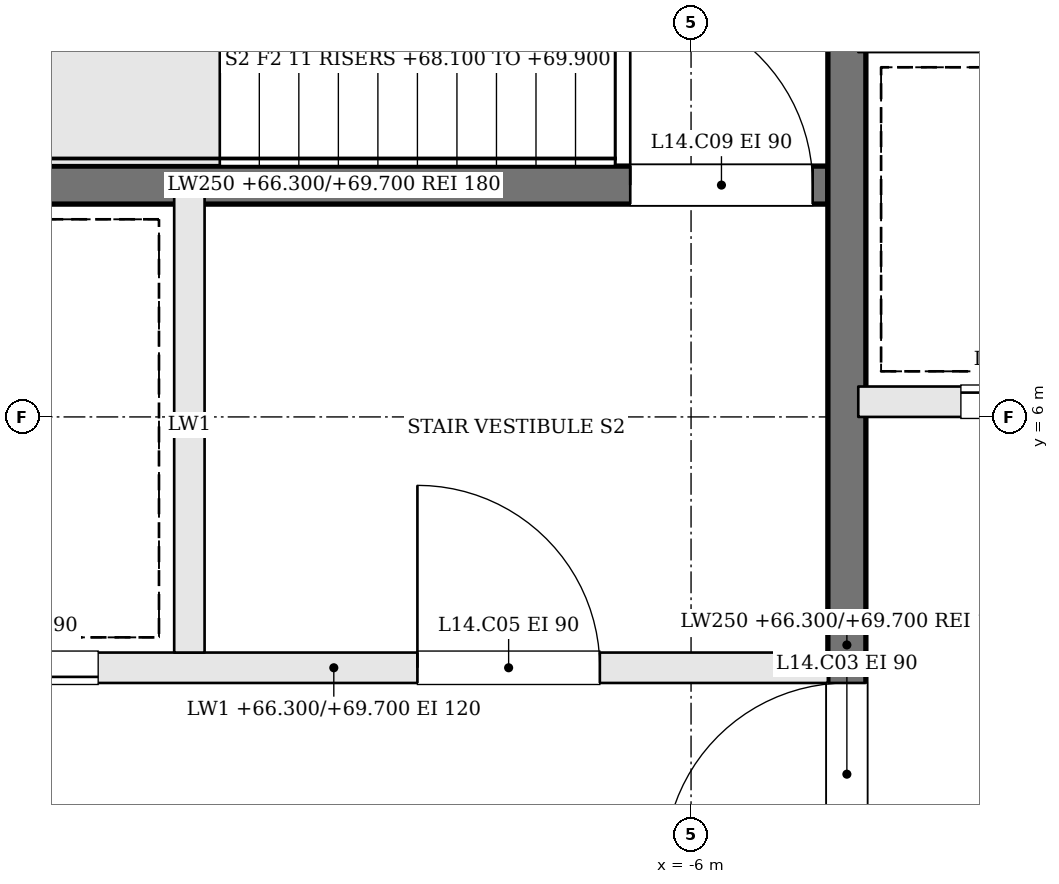
"""IFC4 building model, lengths in metres.
Left out: names, types, materials, properties, quantities, classifications, styles, units other than length and angle.
Written with IfcOpenShell. Run it as: python <this file> out.ifc"""

import sys

from ifc_helpers import new_model, si_unit, direction, frame, frame_2d, origin, place, context, subcontext, project, spatial, rectangle, extrude, element, fill, save


model = new_model("IFC4")
c1 = context("Model", 3, precision=1e-05, world=origin(), true_north=direction((0.0, 1.0)))
c2 = subcontext(c1, "Body", "Model", "MODEL_VIEW")
j1 = project(units=[si_unit("LENGTHUNIT", "METRE"), si_unit("PLANEANGLEUNIT", "RADIAN")], contexts=[c1])
p1 = place(None, origin())
s1 = spatial("IfcSite", under=j1, at=p1, CompositionType="ELEMENT")
p2 = place(p1, origin())
s2 = spatial("IfcBuilding", under=s1, at=p2, CompositionType="ELEMENT")
p3 = place(p2, frame((0.0, 0.0, 66.3)))
s3 = spatial("IfcBuildingStorey", under=s2, at=p3, CompositionType="ELEMENT", Elevation=66.3)
p4 = place(p3, frame((-11.6, 4.35, 0.0), z_axis=(0.0, 0.0, 1.0), x_axis=(1.0, 0.0, 0.0)))
e1 = element("IfcWall", 1, at=p4, inside=s3, PredefinedType="SOLIDWALL", context=c2, shape_type="SweptSolid", body=[
    extrude(rectangle(XDim=6.5, YDim=0.2, at=frame_2d((3.25, 0.0))), origin(), (0.0, 0.0, 1.0), 3.4),
])
p5 = place(p4, frame((3.8, 0.0, 0.0)))
e2 = element("IfcOpeningElement", 2, at=p5, cuts=e1, PredefinedType="OPENING", context=c2, shape_type="SweptSolid", body=[
    extrude(rectangle(XDim=1.2, YDim=2.1, at=frame_2d((0.6, 1.05))), frame((0.0, 0.11, 0.0), z_axis=(0.0, -1.0, 0.0), x_axis=(1.0, 0.0, 0.0)), (0.0, 0.0, 1.0), 0.22),
])
p6 = place(p4, frame((0.5, 0.0, 0.0)))
e3 = element("IfcOpeningElement", 3, at=p6, cuts=e1, PredefinedType="OPENING", context=c2, shape_type="SweptSolid", body=[
    extrude(rectangle(XDim=1.2, YDim=2.1, at=frame_2d((0.6, 1.05))), frame((0.0, 0.11, 0.0), z_axis=(0.0, -1.0, 0.0), x_axis=(1.0, 0.0, 0.0)), (0.0, 0.0, 1.0), 0.22),
])
p7 = place(p3, frame((-11.6, 7.525, 0.0), z_axis=(0.0, 0.0, 1.0), x_axis=(1.0, 0.0, 0.0)))
e4 = element("IfcWall", 4, at=p7, inside=s3, PredefinedType="SOLIDWALL", context=c2, shape_type="SweptSolid", body=[
    extrude(rectangle(XDim=6.5, YDim=0.25, at=frame_2d((3.25, 0.0))), origin(), (0.0, 0.0, 1.0), 3.4),
])
p8 = place(p7, frame((5.2, 0.0, 0.0)))
e5 = element("IfcOpeningElement", 5, at=p8, cuts=e4, PredefinedType="OPENING", context=c2, shape_type="SweptSolid", body=[
    extrude(rectangle(XDim=1.2, YDim=2.1, at=frame_2d((0.6, 1.05))), frame((0.0, 0.135, 0.0), z_axis=(0.0, -1.0, 0.0), x_axis=(1.0, 0.0, 0.0)), (0.0, 0.0, 1.0), 0.27),
])
p9 = place(p3, frame((-9.3, 4.45, 0.0), z_axis=(0.0, 0.0, 1.0), x_axis=(0.0, 1.0, 0.0)))
e6 = element("IfcWall", 6, at=p9, inside=s3, PredefinedType="SOLIDWALL", context=c2, shape_type="SweptSolid", body=[
    extrude(rectangle(XDim=3.0, YDim=0.2, at=frame_2d((1.5, 0.0))), origin(), (0.0, 0.0, 1.0), 3.4),
])
p10 = place(p3, frame((-4.975, -1.6, 0.0), z_axis=(0.0, 0.0, 1.0), x_axis=(0.0, 1.0, 0.0)))
e7 = element("IfcWall", 7, at=p10, inside=s3, PredefinedType="SOLIDWALL", context=c2, shape_type="SweptSolid", body=[
    extrude(rectangle(XDim=12.2, YDim=0.25, at=frame_2d((6.1, 0.0))), origin(), (0.0, 0.0, 1.0), 3.4),
])
p11 = place(p10, frame((4.65, 0.0, 0.0)))
e8 = element("IfcOpeningElement", 8, at=p11, cuts=e7, PredefinedType="OPENING", context=c2, shape_type="SweptSolid", body=[
    extrude(rectangle(XDim=1.2, YDim=2.1, at=frame_2d((0.6, 1.05))), frame((0.0, 0.135, 0.0), z_axis=(0.0, -1.0, 0.0), x_axis=(1.0, 0.0, 0.0)), (0.0, 0.0, 1.0), 0.27),
])
p12 = place(p3, frame((-4.9, 6.1, 0.0), z_axis=(0.0, 0.0, 1.0), x_axis=(1.0, 0.0, 0.0)))
e9 = element("IfcWall", 9, at=p12, inside=s3, PredefinedType="SOLIDWALL", context=c2, shape_type="SweptSolid", body=[
    extrude(rectangle(XDim=9.8, YDim=0.2, at=frame_2d((4.9, 0.0))), origin(), (0.0, 0.0, 1.0), 3.4),
])
p13 = place(p12, frame((0.675, 0.0, 0.0)))
e10 = element("IfcOpeningElement", 10, at=p13, cuts=e9, PredefinedType="OPENING", context=c2, shape_type="SweptSolid", body=[
    extrude(rectangle(XDim=1.1, YDim=2.1, at=frame_2d((0.55, 1.05))), frame((0.0, 0.11, 0.0), z_axis=(0.0, -1.0, 0.0), x_axis=(1.0, 0.0, 0.0)), (0.0, 0.0, 1.0), 0.22),
])
p14 = place(p12, frame((3.125, 0.0, 0.0)))
e11 = element("IfcOpeningElement", 11, at=p14, cuts=e9, PredefinedType="OPENING", context=c2, shape_type="SweptSolid", body=[
    extrude(rectangle(XDim=1.1, YDim=2.1, at=frame_2d((0.55, 1.05))), frame((0.0, 0.11, 0.0), z_axis=(0.0, -1.0, 0.0), x_axis=(1.0, 0.0, 0.0)), (0.0, 0.0, 1.0), 0.22),
])
p15 = place(p12, frame((5.575, 0.0, 0.0)))
e12 = element("IfcOpeningElement", 12, at=p15, cuts=e9, PredefinedType="OPENING", context=c2, shape_type="SweptSolid", body=[
    extrude(rectangle(XDim=1.1, YDim=2.1, at=frame_2d((0.55, 1.05))), frame((0.0, 0.11, 0.0), z_axis=(0.0, -1.0, 0.0), x_axis=(1.0, 0.0, 0.0)), (0.0, 0.0, 1.0), 0.22),
])
p16 = place(p12, frame((8.025, 0.0, 0.0)))
e13 = element("IfcOpeningElement", 13, at=p16, cuts=e9, PredefinedType="OPENING", context=c2, shape_type="SweptSolid", body=[
    extrude(rectangle(XDim=1.1, YDim=2.1, at=frame_2d((0.55, 1.05))), frame((0.0, 0.11, 0.0), z_axis=(0.0, -1.0, 0.0), x_axis=(1.0, 0.0, 0.0)), (0.0, 0.0, 1.0), 0.22),
])
p17 = place(p11, origin())
e14 = element("IfcDoor", 14, at=p17, inside=s3, OperationType="SINGLE_SWING_LEFT", PredefinedType="DOOR", context=c2, shape_type="SweptSolid", body=[
    extrude(rectangle(XDim=1.2, YDim=2.1, at=frame_2d((0.6, 1.05))), frame((0.0, 0.025, 0.0), z_axis=(0.0, -1.0, 0.0), x_axis=(1.0, 0.0, 0.0)), (0.0, 0.0, 1.0), 0.05),
])
fill(e8, e14)
p18 = place(p5, origin())
e15 = element("IfcDoor", 15, at=p18, inside=s3, OperationType="SINGLE_SWING_LEFT", PredefinedType="DOOR", context=c2, shape_type="SweptSolid", body=[
    extrude(rectangle(XDim=1.2, YDim=2.1, at=frame_2d((0.6, 1.05))), frame((0.0, 0.025, 0.0), z_axis=(0.0, -1.0, 0.0), x_axis=(1.0, 0.0, 0.0)), (0.0, 0.0, 1.0), 0.05),
])
fill(e2, e15)
p19 = place(p8, origin())
e16 = element("IfcDoor", 16, at=p19, inside=s3, OperationType="SINGLE_SWING_LEFT", PredefinedType="DOOR", context=c2, shape_type="SweptSolid", body=[
    extrude(rectangle(XDim=1.2, YDim=2.1, at=frame_2d((0.6, 1.05))), frame((0.0, 0.025, 0.0), z_axis=(0.0, -1.0, 0.0), x_axis=(1.0, 0.0, 0.0)), (0.0, 0.0, 1.0), 0.05),
])
fill(e5, e16)
p20 = place(p6, origin())
e17 = element("IfcDoor", 17, at=p20, inside=s3, OperationType="SLIDING_TO_RIGHT", PredefinedType="DOOR", context=c2, shape_type="SweptSolid", body=[
    extrude(rectangle(XDim=1.2, YDim=2.1, at=frame_2d((0.6, 1.05))), frame((0.0, 0.025, 0.0), z_axis=(0.0, -1.0, 0.0), x_axis=(1.0, 0.0, 0.0)), (0.0, 0.0, 1.0), 0.05),
])
fill(e3, e17)
p21 = place(p13, origin())
e18 = element("IfcDoor", 18, at=p21, inside=s3, OperationType="SLIDING_TO_RIGHT", PredefinedType="DOOR", context=c2, shape_type="SweptSolid", body=[
    extrude(rectangle(XDim=1.1, YDim=2.1, at=frame_2d((0.55, 1.05))), frame((0.0, 0.025, 0.0), z_axis=(0.0, -1.0, 0.0), x_axis=(1.0, 0.0, 0.0)), (0.0, 0.0, 1.0), 0.05),
])
fill(e10, e18)
save(model, sys.argv[1])
